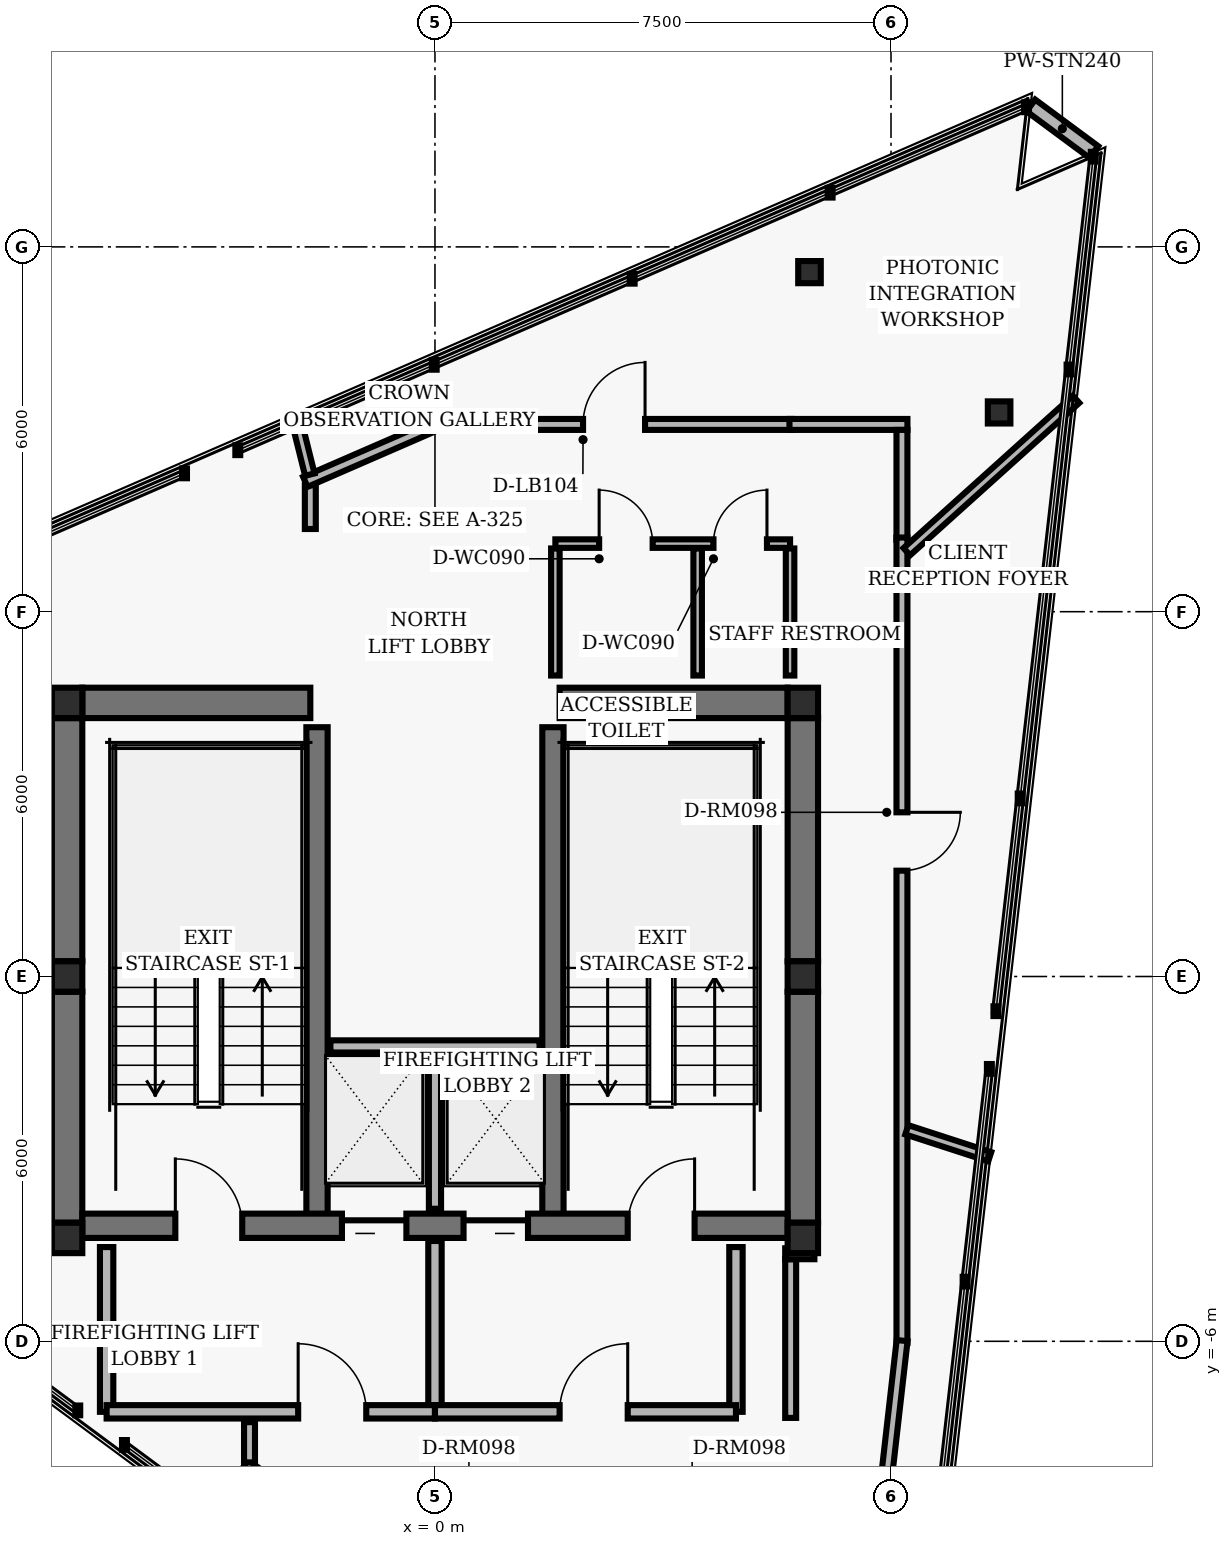
"""IFC4 building model, lengths in metres.
Left out: names, types, materials, properties, quantities, classifications, styles, units other than length and angle.
Written with IfcOpenShell. Run it as: python <this file> out.ifc"""

import sys

from ifc_helpers import new_model, si_unit, direction, frame, frame_2d, origin, origin_2d, place, context, subcontext, project, spatial, rectangle, hollow_rectangle, i_section, extrude, element, fill, save


model = new_model("IFC4")
c1 = context("Model", 3, precision=1e-05, world=origin(), true_north=direction((0.0, 1.0)))
c2 = subcontext(c1, "Body", "Model", "MODEL_VIEW")
j1 = project(units=[si_unit("LENGTHUNIT", "METRE"), si_unit("PLANEANGLEUNIT", "RADIAN")], contexts=[c1])
p1 = place(None, origin())
s1 = spatial("IfcSite", under=j1, at=p1, CompositionType="ELEMENT")
p2 = place(p1, origin())
s2 = spatial("IfcBuilding", under=s1, at=p2, CompositionType="ELEMENT")
p3 = place(p2, frame((0.0, 0.0, 249.12)))
s3 = spatial("IfcBuildingStorey", under=s2, at=p3, CompositionType="ELEMENT", Elevation=249.12)
for number, where, z_axis, x_axis in (
    (1, (-6.05, 4.5, 0.0), (0.0, 0.0, 1.0), (1.0, 0.0, 0.0)),
    (2, (6.05, 4.5, 0.0), (0.0, 0.0, 1.0), (1.0, 0.0, 0.0)),
    (3, (-6.05, 0.0, 0.0), (0.0, 0.0, 1.0), (1.0, 0.0, 0.0)),
    (4, (6.05, 0.0, 0.0), (0.0, 0.0, 1.0), (1.0, 0.0, 0.0)),
    (5, (-6.05, -4.3, 0.0), (0.0, 0.0, 1.0), (1.0, 0.0, 0.0)),
    (6, (6.05, -4.3, 0.0), (0.0, 0.0, 1.0), (1.0, 0.0, 0.0)),
):
    element("IfcColumn", number, at=place(p3, frame(where, z_axis=z_axis, x_axis=x_axis)), inside=s3, PredefinedType="COLUMN", context=c2, shape_type="SweptSolid", body=[
        extrude(hollow_rectangle(XDim=0.5, YDim=0.5, WallThickness=0.02, InnerFilletRadius=0.02, OuterFilletRadius=0.04, at=origin_2d()), origin(), (0.0, 0.0, 1.0), 2.88),
    ])
p4 = place(p3, frame((-6.05, 0.25, 0.0), z_axis=(0.0, 0.0, 1.0), x_axis=(0.0, 1.0, 0.0)))
e7 = element("IfcWall", 7, at=p4, inside=s3, PredefinedType="SHEAR", context=c2, shape_type="SweptSolid", body=[
    extrude(rectangle(XDim=4.0, YDim=0.5, at=frame_2d((2.0, 0.0))), origin(), (0.0, 0.0, 1.0), 2.648),
])
p5 = place(p3, frame((-6.05, -4.05, 0.0), z_axis=(0.0, 0.0, 1.0), x_axis=(0.0, 1.0, 0.0)))
e8 = element("IfcWall", 8, at=p5, inside=s3, PredefinedType="SHEAR", context=c2, shape_type="SweptSolid", body=[
    extrude(rectangle(XDim=3.8, YDim=0.5, at=frame_2d((1.9, 0.0))), origin(), (0.0, 0.0, 1.0), 2.648),
])
p6 = place(p3, frame((6.05, 0.25, 0.0), z_axis=(0.0, 0.0, 1.0), x_axis=(0.0, 1.0, 0.0)))
e9 = element("IfcWall", 9, at=p6, inside=s3, PredefinedType="SHEAR", context=c2, shape_type="SweptSolid", body=[
    extrude(rectangle(XDim=4.0, YDim=0.5, at=frame_2d((2.0, 0.0))), origin(), (0.0, 0.0, 1.0), 2.648),
])
p7 = place(p3, frame((6.05, -4.05, 0.0), z_axis=(0.0, 0.0, 1.0), x_axis=(0.0, 1.0, 0.0)))
e10 = element("IfcWall", 10, at=p7, inside=s3, PredefinedType="SHEAR", context=c2, shape_type="SweptSolid", body=[
    extrude(rectangle(XDim=3.8, YDim=0.5, at=frame_2d((1.9, 0.0))), origin(), (0.0, 0.0, 1.0), 2.648),
])
for number, where, z_axis, x_axis in (
    (11, (-1.94, -4.1, 0.0), (0.0, 0.0, 1.0), (0.0, 1.0, 0.0)),
    (12, (1.94, -4.1, 0.0), (0.0, 0.0, 1.0), (0.0, 1.0, 0.0)),
):
    element("IfcWall", number, at=place(p3, frame(where, z_axis=z_axis, x_axis=x_axis)), inside=s3, PredefinedType="SHEAR", context=c2, shape_type="SweptSolid", body=[
        extrude(rectangle(XDim=8.2, YDim=0.35, at=frame_2d((4.1, 0.0))), origin(), (0.0, 0.0, 1.0), 2.648),
    ])
p8 = place(p3, frame((-5.8, -4.1, 0.0), z_axis=(0.0, 0.0, 1.0), x_axis=(1.0, 0.0, 0.0)))
e13 = element("IfcWall", 13, at=p8, inside=s3, PredefinedType="SHEAR", context=c2, shape_type="SweptSolid", body=[
    extrude(rectangle(XDim=11.6, YDim=0.4, at=frame_2d((5.8, 0.0))), origin(), (0.0, 0.0, 1.0), 2.648),
])
p9 = place(p8, frame((1.53, 0.0, 0.0)))
e14 = element("IfcOpeningElement", 14, at=p9, cuts=e13, PredefinedType="OPENING", context=c2, shape_type="SweptSolid", body=[
    extrude(rectangle(XDim=1.1, YDim=2.04, at=frame_2d((0.55, 1.02))), frame((0.0, 0.21, 0.0), z_axis=(0.0, -1.0, 0.0), x_axis=(1.0, 0.0, 0.0)), (0.0, 0.0, 1.0), 0.42),
])
p10 = place(p8, frame((8.97, 0.0, 0.0)))
e15 = element("IfcOpeningElement", 15, at=p10, cuts=e13, PredefinedType="OPENING", context=c2, shape_type="SweptSolid", body=[
    extrude(rectangle(XDim=1.1, YDim=2.04, at=frame_2d((0.55, 1.02))), frame((0.0, 0.21, 0.0), z_axis=(0.0, -1.0, 0.0), x_axis=(1.0, 0.0, 0.0)), (0.0, 0.0, 1.0), 0.42),
])
p11 = place(p8, frame((4.27, 0.0, 0.0)))
e16 = element("IfcOpeningElement", 16, at=p11, cuts=e13, PredefinedType="OPENING", context=c2, shape_type="SweptSolid", body=[
    extrude(rectangle(XDim=1.06, YDim=2.04, at=frame_2d((0.53, 1.02))), frame((0.0, 0.21, 0.0), z_axis=(0.0, -1.0, 0.0), x_axis=(1.0, 0.0, 0.0)), (0.0, 0.0, 1.0), 0.42),
])
p12 = place(p8, frame((6.27, 0.0, 0.0)))
e17 = element("IfcOpeningElement", 17, at=p12, cuts=e13, PredefinedType="OPENING", context=c2, shape_type="SweptSolid", body=[
    extrude(rectangle(XDim=1.06, YDim=2.04, at=frame_2d((0.53, 1.02))), frame((0.0, 0.21, 0.0), z_axis=(0.0, -1.0, 0.0), x_axis=(1.0, 0.0, 0.0)), (0.0, 0.0, 1.0), 0.42),
])
for number, where, z_axis, x_axis in (
    (18, (-5.8, 4.5, 0.0), (0.0, 0.0, 1.0), (1.0, 0.0, 0.0)),
    (19, (2.05, 4.5, 0.0), (0.0, 0.0, 1.0), (1.0, 0.0, 0.0)),
):
    element("IfcWall", number, at=place(p3, frame(where, z_axis=z_axis, x_axis=x_axis)), inside=s3, PredefinedType="SHEAR", context=c2, shape_type="SweptSolid", body=[
        extrude(rectangle(XDim=3.75, YDim=0.5, at=frame_2d((1.875, 0.0))), origin(), (0.0, 0.0, 1.0), 2.648),
    ])
for number, where, z_axis, x_axis in (
    (20, (9.278, 9.277, 0.0), (0.0, 0.0, 1.0), (1.0, 0.0, 0.0)),
    (21, (6.159, 11.585, 0.0), (0.0, 0.0, 1.0), (1.0, 0.0, 0.0)),
):
    element("IfcColumn", number, at=place(p3, frame(where, z_axis=z_axis, x_axis=x_axis)), inside=s3, PredefinedType="COLUMN", context=c2, shape_type="SweptSolid", body=[
        extrude(i_section(OverallWidth=0.371, OverallDepth=0.364, WebThickness=0.013, FlangeThickness=0.022, FilletRadius=0.015, at=origin_2d()), origin(), (0.0, 0.0, 1.0), 2.88),
    ])
p13 = place(p3, frame((10.836, 13.561, 0.0), z_axis=(0.0, 0.0, 1.0), x_axis=(-0.803849147956, 0.594833209673, 0.0)))
e22 = element("IfcWall", 22, at=p13, inside=s3, PredefinedType="PARAPET", context=c2, shape_type="SweptSolid", body=[
    extrude(rectangle(XDim=1.288, YDim=0.24, at=frame_2d((0.644, 0.0))), origin(), (0.0, 0.0, 1.0), 2.168),
])
p14 = place(p3, frame((0.0, -3.82, 0.0), z_axis=(0.0, 0.0, 1.0), x_axis=(0.0, 1.0, 0.0)))
e23 = element("IfcWall", 23, at=p14, inside=s3, PredefinedType="PARTITIONING", context=c2, shape_type="SweptSolid", body=[
    extrude(rectangle(XDim=2.67, YDim=0.2, at=frame_2d((1.335, 0.0))), origin(), (0.0, 0.0, 1.0), 2.623),
])
p15 = place(p3, frame((-1.72, -1.15, 0.0), z_axis=(0.0, 0.0, 1.0), x_axis=(1.0, 0.0, 0.0)))
e24 = element("IfcWall", 24, at=p15, inside=s3, PredefinedType="PARTITIONING", context=c2, shape_type="SweptSolid", body=[
    extrude(rectangle(XDim=3.44, YDim=0.2, at=frame_2d((1.72, 0.0))), origin(), (0.0, 0.0, 1.0), 2.623),
])
for number, where, z_axis, x_axis in (
    (25, (-5.4, -7.16, 0.0), (0.0, 0.0, 1.0), (0.0, 1.0, 0.0)),
    (26, (4.95, -7.16, 0.0), (0.0, 0.0, 1.0), (0.0, 1.0, 0.0)),
):
    element("IfcWall", number, at=place(p3, frame(where, z_axis=z_axis, x_axis=x_axis)), inside=s3, PredefinedType="PARTITIONING", context=c2, shape_type="SweptSolid", body=[
        extrude(rectangle(XDim=2.71, YDim=0.22, at=frame_2d((1.355, 0.0))), origin(), (0.0, 0.0, 1.0), 2.623),
    ])
p16 = place(p3, frame((0.0, -7.16, 0.0), z_axis=(0.0, 0.0, 1.0), x_axis=(0.0, 1.0, 0.0)))
e27 = element("IfcWall", 27, at=p16, inside=s3, PredefinedType="PARTITIONING", context=c2, shape_type="SweptSolid", body=[
    extrude(rectangle(XDim=2.81, YDim=0.22, at=frame_2d((1.405, 0.0))), origin(), (0.0, 0.0, 1.0), 2.623),
])
p17 = place(p3, frame((-5.4, -7.16, 0.0), z_axis=(0.0, 0.0, 1.0), x_axis=(1.0, 0.0, 0.0)))
e28 = element("IfcWall", 28, at=p17, inside=s3, PredefinedType="PARTITIONING", context=c2, shape_type="SweptSolid", body=[
    extrude(rectangle(XDim=5.4, YDim=0.22, at=frame_2d((2.7, 0.0))), origin(), (0.0, 0.0, 1.0), 2.623),
])
p18 = place(p17, frame((3.15, 0.0, 0.0)))
e29 = element("IfcOpeningElement", 29, at=p18, cuts=e28, PredefinedType="OPENING", context=c2, shape_type="SweptSolid", body=[
    extrude(rectangle(XDim=1.12, YDim=2.02, at=frame_2d((0.56, 1.01))), frame((0.0, 0.12, 0.0), z_axis=(0.0, -1.0, 0.0), x_axis=(1.0, 0.0, 0.0)), (0.0, 0.0, 1.0), 0.24),
])
p19 = place(p3, frame((0.0, -7.16, 0.0), z_axis=(0.0, 0.0, 1.0), x_axis=(1.0, 0.0, 0.0)))
e30 = element("IfcWall", 30, at=p19, inside=s3, PredefinedType="PARTITIONING", context=c2, shape_type="SweptSolid", body=[
    extrude(rectangle(XDim=4.95, YDim=0.22, at=frame_2d((2.475, 0.0))), origin(), (0.0, 0.0, 1.0), 2.623),
])
p20 = place(p19, frame((2.05, 0.0, 0.0)))
e31 = element("IfcOpeningElement", 31, at=p20, cuts=e30, PredefinedType="OPENING", context=c2, shape_type="SweptSolid", body=[
    extrude(rectangle(XDim=1.12, YDim=2.02, at=frame_2d((0.56, 1.01))), frame((0.0, 0.12, 0.0), z_axis=(0.0, -1.0, 0.0), x_axis=(1.0, 0.0, 0.0)), (0.0, 0.0, 1.0), 0.24),
])
p21 = place(p3, frame((1.98, 4.95, 0.0), z_axis=(0.0, 0.0, 1.0), x_axis=(0.0, 1.0, 0.0)))
e32 = element("IfcWall", 32, at=p21, inside=s3, PredefinedType="PARTITIONING", context=c2, shape_type="SweptSolid", body=[
    extrude(rectangle(XDim=2.09, YDim=0.14, at=frame_2d((1.045, 0.0))), origin(), (0.0, 0.0, 1.0), 2.623),
])
p22 = place(p3, frame((5.84, 4.95, 0.0), z_axis=(0.0, 0.0, 1.0), x_axis=(0.0, 1.0, 0.0)))
e33 = element("IfcWall", 33, at=p22, inside=s3, PredefinedType="PARTITIONING", context=c2, shape_type="SweptSolid", body=[
    extrude(rectangle(XDim=2.09, YDim=0.14, at=frame_2d((1.045, 0.0))), origin(), (0.0, 0.0, 1.0), 2.153),
])
p23 = place(p3, frame((1.98, 7.12, 0.0), z_axis=(0.0, 0.0, 1.0), x_axis=(1.0, 0.0, 0.0)))
e34 = element("IfcWall", 34, at=p23, inside=s3, PredefinedType="PARTITIONING", context=c2, shape_type="SweptSolid", body=[
    extrude(rectangle(XDim=3.86, YDim=0.14, at=frame_2d((1.93, 0.0))), origin(), (0.0, 0.0, 1.0), 2.623),
])
p24 = place(p23, frame((0.72, 0.0, 0.0)))
e35 = element("IfcOpeningElement", 35, at=p24, cuts=e34, PredefinedType="OPENING", context=c2, shape_type="SweptSolid", body=[
    extrude(rectangle(XDim=0.88, YDim=2.02, at=frame_2d((0.44, 1.01))), frame((0.0, 0.08, 0.0), z_axis=(0.0, -1.0, 0.0), x_axis=(1.0, 0.0, 0.0)), (0.0, 0.0, 1.0), 0.16),
])
p25 = place(p23, frame((2.6, 0.0, 0.0)))
e36 = element("IfcOpeningElement", 36, at=p25, cuts=e34, PredefinedType="OPENING", context=c2, shape_type="SweptSolid", body=[
    extrude(rectangle(XDim=0.88, YDim=2.02, at=frame_2d((0.44, 1.01))), frame((0.0, 0.08, 0.0), z_axis=(0.0, -1.0, 0.0), x_axis=(1.0, 0.0, 0.0)), (0.0, 0.0, 1.0), 0.16),
])
p26 = place(p3, frame((4.32, 4.95, 0.0), z_axis=(0.0, 0.0, 1.0), x_axis=(0.0, 1.0, 0.0)))
e37 = element("IfcWall", 37, at=p26, inside=s3, PredefinedType="PARTITIONING", context=c2, shape_type="SweptSolid", body=[
    extrude(rectangle(XDim=2.09, YDim=0.14, at=frame_2d((1.045, 0.0))), origin(), (0.0, 0.0, 1.0), 2.623),
])
p27 = place(p3, frame((-2.007, -8.854, 0.0), z_axis=(0.0, 0.0, 1.0), x_axis=(-0.803868825014, 0.594806617458, 0.0)))
e38 = element("IfcWall", 38, at=p27, inside=s3, PredefinedType="PARTITIONING", context=c2, shape_type="SweptSolid", body=[
    extrude(rectangle(XDim=1.387, YDim=0.18, at=frame_2d((0.694, 0.0))), origin(), (0.0, 0.0, 1.0), 2.203),
])
p28 = place(p3, frame((-3.05, -7.992, 0.0), z_axis=(0.0, 0.0, 1.0), x_axis=(0.0, 1.0, 0.0)))
e39 = element("IfcWall", 39, at=p28, inside=s3, PredefinedType="PARTITIONING", context=c2, shape_type="SweptSolid", body=[
    extrude(rectangle(XDim=0.662, YDim=0.18, at=frame_2d((0.331, 0.0))), origin(), (0.0, 0.0, 1.0), 2.623),
])
p29 = place(p3, frame((5.85, -7.26, 0.0), z_axis=(0.0, 0.0, 1.0), x_axis=(0.0, 1.0, 0.0)))
e40 = element("IfcWall", 40, at=p29, inside=s3, PredefinedType="PARTITIONING", context=c2, shape_type="SweptSolid", body=[
    extrude(rectangle(XDim=2.61, YDim=0.18, at=frame_2d((1.305, 0.0))), origin(), (0.0, 0.0, 1.0), 2.153),
])
p30 = place(p3, frame((5.76, -4.56, 0.0), z_axis=(0.0, 0.0, 1.0), x_axis=(1.0, 0.0, 0.0)))
e41 = element("IfcWall", 41, at=p30, inside=s3, PredefinedType="PARTITIONING", context=c2, shape_type="SweptSolid", body=[
    extrude(rectangle(XDim=0.48, YDim=0.18, at=frame_2d((0.24, 0.0))), origin(), (0.0, 0.0, 1.0), 2.623),
])
p31 = place(p3, frame((-2.05, 7.36, 0.0), z_axis=(0.0, 0.0, 1.0), x_axis=(0.0, 1.0, 0.0)))
e42 = element("IfcWall", 42, at=p31, inside=s3, PredefinedType="PARTITIONING", context=c2, shape_type="SweptSolid", body=[
    extrude(rectangle(XDim=0.721, YDim=0.18, at=frame_2d((0.36, 0.0))), origin(), (0.0, 0.0, 1.0), 2.623),
])
p32 = place(p3, frame((-2.133, 8.135, 0.0), z_axis=(0.0, 0.0, 1.0), x_axis=(0.917076554143, 0.398711165935, 0.0)))
e43 = element("IfcWall", 43, at=p32, inside=s3, PredefinedType="PARTITIONING", context=c2, shape_type="SweptSolid", body=[
    extrude(rectangle(XDim=2.389, YDim=0.18, at=frame_2d((1.195, 0.0))), origin(), (0.0, 0.0, 1.0), 2.203),
])
p33 = place(p3, frame((0.02, 9.08, 0.0), z_axis=(0.0, 0.0, 1.0), x_axis=(1.0, 0.0, 0.0)))
e44 = element("IfcWall", 44, at=p33, inside=s3, PredefinedType="PARTITIONING", context=c2, shape_type="SweptSolid", body=[
    extrude(rectangle(XDim=5.85, YDim=0.18, at=frame_2d((2.925, 0.0))), origin(), (0.0, 0.0, 1.0), 2.623),
])
p34 = place(p33, frame((2.415, 0.0, 0.0)))
e45 = element("IfcOpeningElement", 45, at=p34, cuts=e44, PredefinedType="OPENING", context=c2, shape_type="SweptSolid", body=[
    extrude(rectangle(XDim=1.02, YDim=2.02, at=frame_2d((0.51, 1.01))), frame((0.0, 0.1, 0.0), z_axis=(0.0, -1.0, 0.0), x_axis=(1.0, 0.0, 0.0)), (0.0, 0.0, 1.0), 0.2),
])
p35 = place(p3, frame((5.83, 9.08, 0.0), z_axis=(0.0, 0.0, 1.0), x_axis=(1.0, 0.0, 0.0)))
e46 = element("IfcWall", 46, at=p35, inside=s3, PredefinedType="PARTITIONING", context=c2, shape_type="SweptSolid", body=[
    extrude(rectangle(XDim=1.94, YDim=0.18, at=frame_2d((0.97, 0.0))), origin(), (0.0, 0.0, 1.0), 2.623),
])
p36 = place(p3, frame((7.68, 8.99, 0.0), z_axis=(0.0, 0.0, 1.0), x_axis=(0.0, -1.0, 0.0)))
e47 = element("IfcWall", 47, at=p36, inside=s3, PredefinedType="PARTITIONING", context=c2, shape_type="SweptSolid", body=[
    extrude(rectangle(XDim=1.81, YDim=0.18, at=frame_2d((0.905, 0.0))), origin(), (0.0, 0.0, 1.0), 2.623),
])
p37 = place(p3, frame((7.68, 7.22, 0.0), z_axis=(0.0, 0.0, 1.0), x_axis=(0.0, -1.0, 0.0)))
e48 = element("IfcWall", 48, at=p37, inside=s3, PredefinedType="PARTITIONING", context=c2, shape_type="SweptSolid", body=[
    extrude(rectangle(XDim=13.248, YDim=0.18, at=frame_2d((6.624, 0.0))), origin(), (0.0, 0.0, 1.0), 2.203),
])
p38 = place(p37, frame((4.52, 0.0, 0.0)))
e49 = element("IfcOpeningElement", 49, at=p38, cuts=e48, PredefinedType="OPENING", context=c2, shape_type="SweptSolid", body=[
    extrude(rectangle(XDim=0.96, YDim=2.02, at=frame_2d((0.48, 1.01))), frame((0.0, 0.1, 0.0), z_axis=(0.0, -1.0, 0.0), x_axis=(1.0, 0.0, 0.0)), (0.0, 0.0, 1.0), 0.2),
])
p39 = place(p3, frame((7.682, -5.989, 0.0), z_axis=(0.0, 0.0, 1.0), x_axis=(-0.113257574401, -0.993565660558, 0.0)))
e50 = element("IfcWall", 50, at=p39, inside=s3, PredefinedType="PARTITIONING", context=c2, shape_type="SweptSolid", body=[
    extrude(rectangle(XDim=2.74, YDim=0.18, at=frame_2d((1.37, 0.0))), origin(), (0.0, 0.0, 1.0), 2.203),
])
p40 = place(p3, frame((7.76, -2.521, 0.0), z_axis=(0.0, 0.0, 1.0), x_axis=(0.951056587506, -0.30901677521, 0.0)))
e51 = element("IfcWall", 51, at=p40, inside=s3, PredefinedType="PARTITIONING", context=c2, shape_type="SweptSolid", body=[
    extrude(rectangle(XDim=1.434, YDim=0.16, at=frame_2d((0.717, 0.0))), origin(), (0.0, 0.0, 1.0), 2.623),
])
p41 = place(p3, frame((7.76, 6.987, 0.0), z_axis=(0.0, 0.0, 1.0), x_axis=(0.743132057251, 0.669144786639, 0.0)))
e52 = element("IfcWall", 52, at=p41, inside=s3, PredefinedType="PARTITIONING", context=c2, shape_type="SweptSolid", body=[
    extrude(rectangle(XDim=3.745, YDim=0.16, at=frame_2d((1.873, 0.0))), origin(), (0.0, 0.0, 1.0), 2.153),
])
p42 = place(p3, frame((-2.058, 8.255, 0.0), z_axis=(0.0, 0.0, 1.0), x_axis=(-0.242030631144, 0.970268608988, 0.0)))
e53 = element("IfcWall", 53, at=p42, inside=s3, PredefinedType="PARTITIONING", context=c2, shape_type="SweptSolid", body=[
    extrude(rectangle(XDim=1.024, YDim=0.16, at=frame_2d((0.512, 0.0))), origin(), (0.0, 0.0, 1.0), 2.623),
])
p43 = place(p9, origin())
e54 = element("IfcDoor", 54, at=p43, inside=s3, OperationType="SINGLE_SWING_LEFT", PredefinedType="DOOR", context=c2, shape_type="SweptSolid", body=[
    extrude(rectangle(XDim=1.1, YDim=2.04, at=frame_2d((0.55, 1.02))), frame((0.0, 0.025, 0.0), z_axis=(0.0, -1.0, 0.0), x_axis=(1.0, 0.0, 0.0)), (0.0, 0.0, 1.0), 0.05),
])
fill(e14, e54)
p44 = place(p10, origin())
e55 = element("IfcDoor", 55, at=p44, inside=s3, OperationType="SINGLE_SWING_RIGHT", PredefinedType="DOOR", context=c2, shape_type="SweptSolid", body=[
    extrude(rectangle(XDim=1.1, YDim=2.04, at=frame_2d((0.55, 1.02))), frame((0.0, 0.025, 0.0), z_axis=(0.0, -1.0, 0.0), x_axis=(1.0, 0.0, 0.0)), (0.0, 0.0, 1.0), 0.05),
])
fill(e15, e55)
p45 = place(p11, origin())
e56 = element("IfcDoor", 56, at=p45, inside=s3, OperationType="SLIDING_TO_LEFT", PredefinedType="DOOR", context=c2, shape_type="SweptSolid", body=[
    extrude(rectangle(XDim=1.06, YDim=2.04, at=frame_2d((0.53, 1.02))), frame((0.0, 0.025, 0.0), z_axis=(0.0, -1.0, 0.0), x_axis=(1.0, 0.0, 0.0)), (0.0, 0.0, 1.0), 0.05),
])
fill(e16, e56)
p46 = place(p12, origin())
e57 = element("IfcDoor", 57, at=p46, inside=s3, OperationType="SLIDING_TO_RIGHT", PredefinedType="DOOR", context=c2, shape_type="SweptSolid", body=[
    extrude(rectangle(XDim=1.06, YDim=2.04, at=frame_2d((0.53, 1.02))), frame((0.0, 0.025, 0.0), z_axis=(0.0, -1.0, 0.0), x_axis=(1.0, 0.0, 0.0)), (0.0, 0.0, 1.0), 0.05),
])
fill(e17, e57)
p47 = place(p18, origin())
e58 = element("IfcDoor", 58, at=p47, inside=s3, OperationType="SINGLE_SWING_LEFT", PredefinedType="DOOR", context=c2, shape_type="SweptSolid", body=[
    extrude(rectangle(XDim=1.12, YDim=2.02, at=frame_2d((0.56, 1.01))), frame((0.0, 0.025, 0.0), z_axis=(0.0, -1.0, 0.0), x_axis=(1.0, 0.0, 0.0)), (0.0, 0.0, 1.0), 0.05),
])
fill(e29, e58)
p48 = place(p20, origin())
e59 = element("IfcDoor", 59, at=p48, inside=s3, OperationType="SINGLE_SWING_RIGHT", PredefinedType="DOOR", context=c2, shape_type="SweptSolid", body=[
    extrude(rectangle(XDim=1.12, YDim=2.02, at=frame_2d((0.56, 1.01))), frame((0.0, 0.025, 0.0), z_axis=(0.0, -1.0, 0.0), x_axis=(1.0, 0.0, 0.0)), (0.0, 0.0, 1.0), 0.05),
])
fill(e31, e59)
p49 = place(p24, origin())
e60 = element("IfcDoor", 60, at=p49, inside=s3, OperationType="SINGLE_SWING_LEFT", PredefinedType="DOOR", context=c2, shape_type="SweptSolid", body=[
    extrude(rectangle(XDim=0.88, YDim=2.02, at=frame_2d((0.44, 1.01))), frame((0.0, 0.025, 0.0), z_axis=(0.0, -1.0, 0.0), x_axis=(1.0, 0.0, 0.0)), (0.0, 0.0, 1.0), 0.05),
])
fill(e35, e60)
p50 = place(p25, origin())
e61 = element("IfcDoor", 61, at=p50, inside=s3, OperationType="SINGLE_SWING_RIGHT", PredefinedType="DOOR", context=c2, shape_type="SweptSolid", body=[
    extrude(rectangle(XDim=0.88, YDim=2.02, at=frame_2d((0.44, 1.01))), frame((0.0, 0.025, 0.0), z_axis=(0.0, -1.0, 0.0), x_axis=(1.0, 0.0, 0.0)), (0.0, 0.0, 1.0), 0.05),
])
fill(e36, e61)
p51 = place(p38, origin())
e62 = element("IfcDoor", 62, at=p51, inside=s3, OperationType="SINGLE_SWING_LEFT", PredefinedType="DOOR", context=c2, shape_type="SweptSolid", body=[
    extrude(rectangle(XDim=0.96, YDim=2.02, at=frame_2d((0.48, 1.01))), frame((0.0, 0.025, 0.0), z_axis=(0.0, -1.0, 0.0), x_axis=(1.0, 0.0, 0.0)), (0.0, 0.0, 1.0), 0.05),
])
fill(e49, e62)
p52 = place(p34, origin())
e63 = element("IfcDoor", 63, at=p52, inside=s3, OperationType="SINGLE_SWING_RIGHT", PredefinedType="DOOR", context=c2, shape_type="SweptSolid", body=[
    extrude(rectangle(XDim=1.02, YDim=2.02, at=frame_2d((0.51, 1.01))), frame((0.0, 0.025, 0.0), z_axis=(0.0, -1.0, 0.0), x_axis=(1.0, 0.0, 0.0)), (0.0, 0.0, 1.0), 0.05),
])
fill(e45, e63)
save(model, sys.argv[1])
